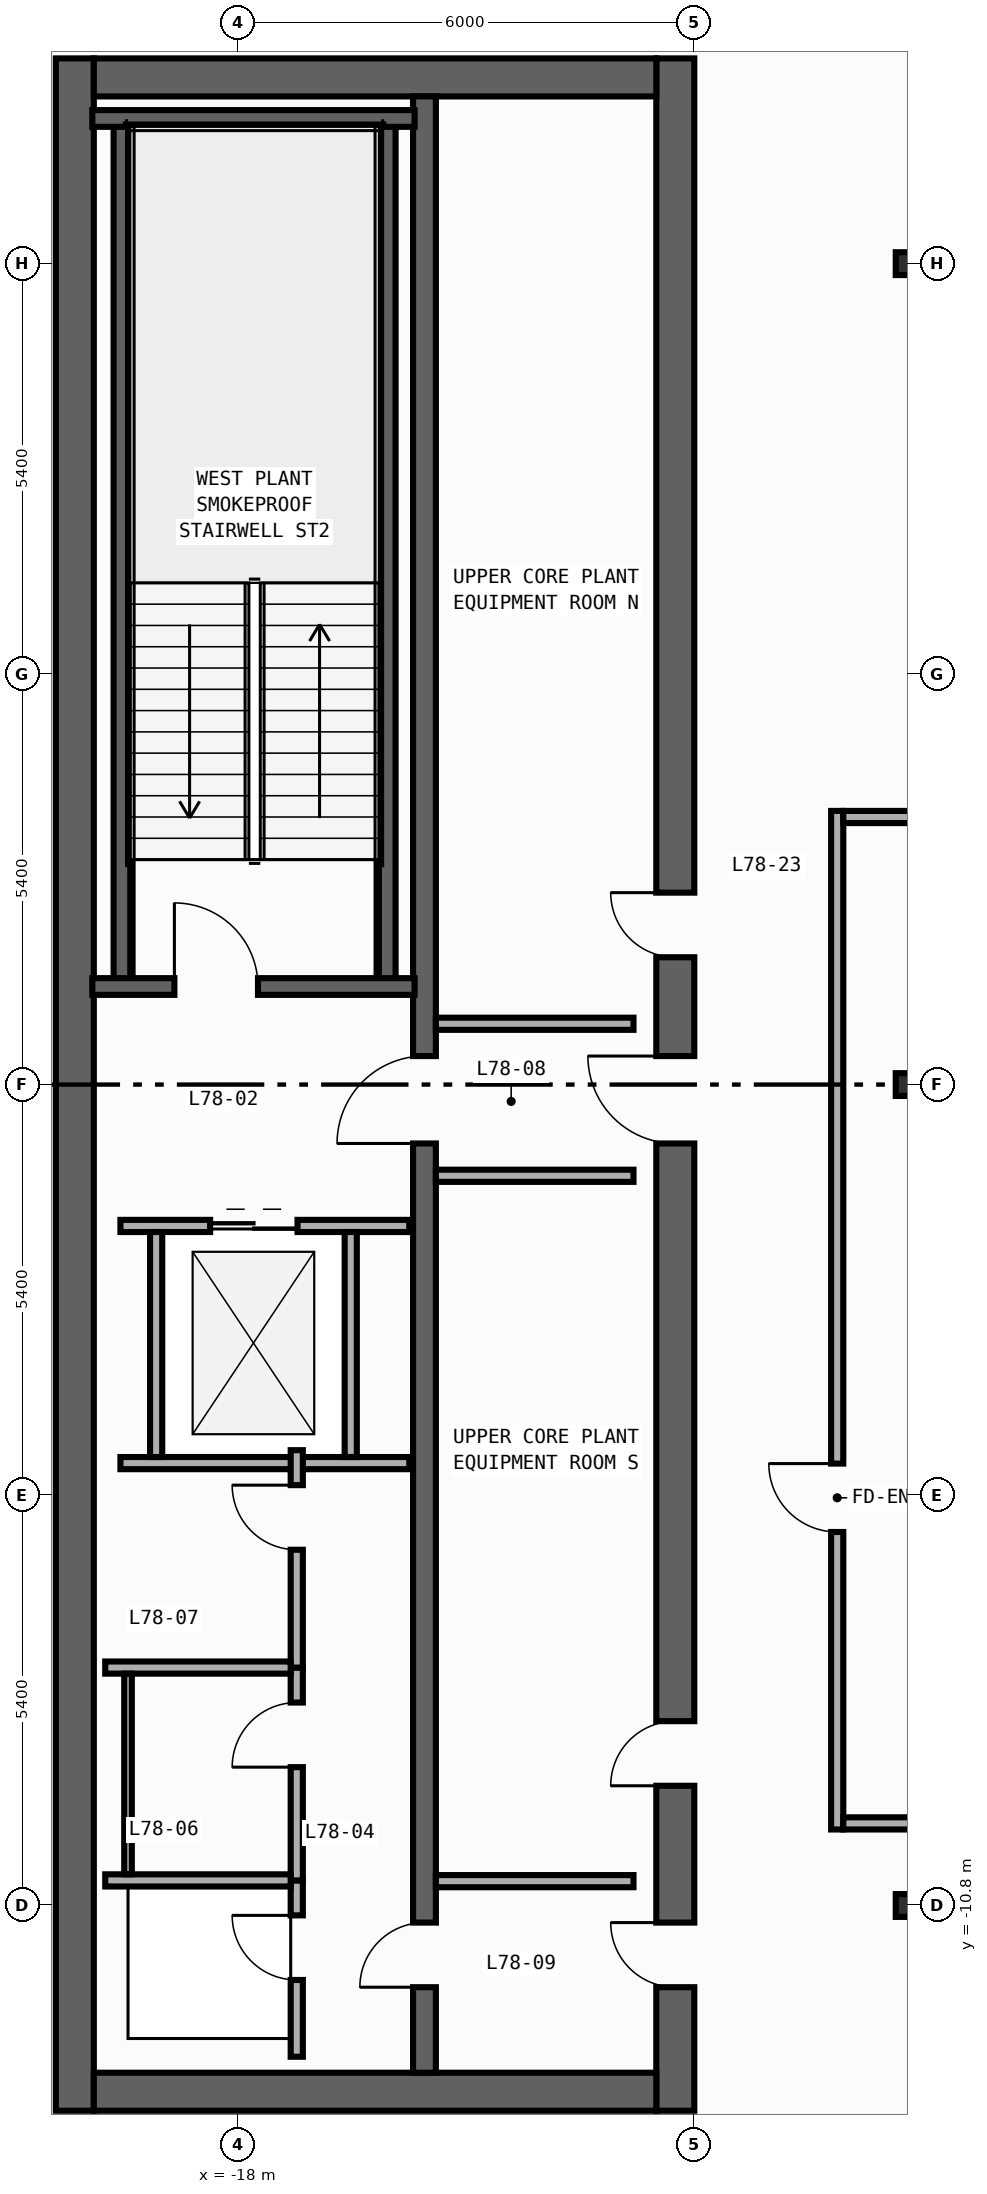
"""IFC4 building model, lengths in metres.
Left out: names, types, materials, properties, quantities, classifications, styles, units other than length and angle.
Written with IfcOpenShell. Run it as: python <this file> out.ifc"""

import sys

from ifc_helpers import new_model, si_unit, direction, frame, frame_2d, origin, origin_2d, place, context, subcontext, project, spatial, rectangle, i_section, extrude, element, fill, save


model = new_model("IFC4")
c1 = context("Model", 3, precision=1e-05, world=origin(), true_north=direction((0.0, 1.0)))
c2 = subcontext(c1, "Body", "Model", "MODEL_VIEW")
j1 = project(units=[si_unit("LENGTHUNIT", "METRE"), si_unit("PLANEANGLEUNIT", "RADIAN")], contexts=[c1])
p1 = place(None, origin())
s1 = spatial("IfcSite", under=j1, at=p1, CompositionType="ELEMENT")
p2 = place(p1, origin())
s2 = spatial("IfcBuilding", under=s1, at=p2, CompositionType="ELEMENT")
p3 = place(p2, frame((0.0, 0.0, 325.2)))
s3 = spatial("IfcBuildingStorey", under=s2, at=p3, CompositionType="ELEMENT", Elevation=325.2)
p4 = place(p3, frame((-20.15, -13.5, 0.0), z_axis=(0.0, 0.0, 1.0), x_axis=(0.0, 1.0, 0.0)))
e1 = element("IfcWall", 1, at=p4, inside=s3, PredefinedType="SHEAR", context=c2, shape_type="SweptSolid", body=[
    extrude(rectangle(XDim=27.0, YDim=0.5, at=frame_2d((13.5, 0.0))), origin(), (0.0, 0.0, 1.0), 4.94),
])
p5 = place(p3, frame((-12.25, -13.5, 0.0), z_axis=(0.0, 0.0, 1.0), x_axis=(0.0, 1.0, 0.0)))
e2 = element("IfcWall", 2, at=p5, inside=s3, PredefinedType="SHEAR", context=c2, shape_type="SweptSolid", body=[
    extrude(rectangle(XDim=27.0, YDim=0.5, at=frame_2d((13.5, 0.0))), origin(), (0.0, 0.0, 1.0), 4.94),
])
p6 = place(p5, frame((15.175, 0.0, 0.0)))
e3 = element("IfcOpeningElement", 3, at=p6, cuts=e2, PredefinedType="OPENING", context=c2, shape_type="SweptSolid", body=[
    extrude(rectangle(XDim=0.85, YDim=2.1, at=frame_2d((0.425, 1.05))), frame((0.0, 0.26, 0.0), z_axis=(0.0, -1.0, 0.0), x_axis=(1.0, 0.0, 0.0)), (0.0, 0.0, 1.0), 0.52),
])
p7 = place(p5, frame((4.275, 0.0, 0.0)))
e4 = element("IfcOpeningElement", 4, at=p7, cuts=e2, PredefinedType="OPENING", context=c2, shape_type="SweptSolid", body=[
    extrude(rectangle(XDim=0.85, YDim=2.1, at=frame_2d((0.425, 1.05))), frame((0.0, 0.26, 0.0), z_axis=(0.0, -1.0, 0.0), x_axis=(1.0, 0.0, 0.0)), (0.0, 0.0, 1.0), 0.52),
])
p8 = place(p5, frame((12.725, 0.0, 0.0)))
e5 = element("IfcOpeningElement", 5, at=p8, cuts=e2, PredefinedType="OPENING", context=c2, shape_type="SweptSolid", body=[
    extrude(rectangle(XDim=1.15, YDim=2.2, at=frame_2d((0.575, 1.1))), frame((0.0, 0.26, 0.0), z_axis=(0.0, -1.0, 0.0), x_axis=(1.0, 0.0, 0.0)), (0.0, 0.0, 1.0), 0.52),
])
p9 = place(p5, frame((1.625, 0.0, 0.0)))
e6 = element("IfcOpeningElement", 6, at=p9, cuts=e2, PredefinedType="OPENING", context=c2, shape_type="SweptSolid", body=[
    extrude(rectangle(XDim=0.85, YDim=2.1, at=frame_2d((0.425, 1.05))), frame((0.0, 0.26, 0.0), z_axis=(0.0, -1.0, 0.0), x_axis=(1.0, 0.0, 0.0)), (0.0, 0.0, 1.0), 0.52),
])
for number, where, z_axis, x_axis in (
    (7, (-19.9, -13.25, 0.0), (0.0, 0.0, 1.0), (1.0, 0.0, 0.0)),
    (8, (-19.9, 13.25, 0.0), (0.0, 0.0, 1.0), (1.0, 0.0, 0.0)),
):
    element("IfcWall", number, at=place(p3, frame(where, z_axis=z_axis, x_axis=x_axis)), inside=s3, PredefinedType="SHEAR", context=c2, shape_type="SweptSolid", body=[
        extrude(rectangle(XDim=7.4, YDim=0.5, at=frame_2d((3.7, 0.0))), origin(), (0.0, 0.0, 1.0), 4.94),
    ])
p10 = place(p3, frame((-15.55, -13.0, 0.0), z_axis=(0.0, 0.0, 1.0), x_axis=(0.0, 1.0, 0.0)))
e9 = element("IfcWall", 9, at=p10, inside=s3, PredefinedType="SHEAR", context=c2, shape_type="SweptSolid", body=[
    extrude(rectangle(XDim=26.0, YDim=0.3, at=frame_2d((13.0, 0.0))), origin(), (0.0, 0.0, 1.0), 4.94),
])
p11 = place(p10, frame((12.225, 0.0, 0.0)))
e10 = element("IfcOpeningElement", 10, at=p11, cuts=e9, PredefinedType="OPENING", context=c2, shape_type="SweptSolid", body=[
    extrude(rectangle(XDim=1.15, YDim=2.2, at=frame_2d((0.575, 1.1))), frame((0.0, 0.16, 0.0), z_axis=(0.0, -1.0, 0.0), x_axis=(1.0, 0.0, 0.0)), (0.0, 0.0, 1.0), 0.32),
])
p12 = place(p10, frame((1.125, 0.0, 0.0)))
e11 = element("IfcOpeningElement", 11, at=p12, cuts=e9, PredefinedType="OPENING", context=c2, shape_type="SweptSolid", body=[
    extrude(rectangle(XDim=0.85, YDim=2.1, at=frame_2d((0.425, 1.05))), frame((0.0, 0.16, 0.0), z_axis=(0.0, -1.0, 0.0), x_axis=(1.0, 0.0, 0.0)), (0.0, 0.0, 1.0), 0.32),
])
for number, where, z_axis, x_axis in (
    (12, (-16.04, 1.29, 0.0), (0.0, 0.0, 1.0), (0.0, 1.0, 0.0)),
    (13, (-19.53, 1.29, 0.0), (0.0, 0.0, 1.0), (0.0, 1.0, 0.0)),
):
    element("IfcWall", number, at=place(p3, frame(where, z_axis=z_axis, x_axis=x_axis)), inside=s3, PredefinedType="SHEAR", context=c2, shape_type="SweptSolid", body=[
        extrude(rectangle(XDim=11.42, YDim=0.22, at=frame_2d((5.71, 0.0))), origin(), (0.0, 0.0, 1.0), 4.94),
    ])
p13 = place(p3, frame((-19.92, 12.71, 0.0), z_axis=(0.0, 0.0, 1.0), x_axis=(1.0, 0.0, 0.0)))
e14 = element("IfcWall", 14, at=p13, inside=s3, PredefinedType="SHEAR", context=c2, shape_type="SweptSolid", body=[
    extrude(rectangle(XDim=4.24, YDim=0.22, at=frame_2d((2.12, 0.0))), origin(), (0.0, 0.0, 1.0), 4.94),
])
p14 = place(p3, frame((-19.92, 1.29, 0.0), z_axis=(0.0, 0.0, 1.0), x_axis=(1.0, 0.0, 0.0)))
e15 = element("IfcWall", 15, at=p14, inside=s3, PredefinedType="SHEAR", context=c2, shape_type="SweptSolid", body=[
    extrude(rectangle(XDim=4.24, YDim=0.22, at=frame_2d((2.12, 0.0))), origin(), (0.0, 0.0, 1.0), 4.94),
])
p15 = place(p14, frame((1.08, 0.0, 0.0)))
e16 = element("IfcOpeningElement", 16, at=p15, cuts=e15, PredefinedType="OPENING", context=c2, shape_type="SweptSolid", body=[
    extrude(rectangle(XDim=1.1, YDim=2.2, at=frame_2d((0.55, 1.1))), frame((0.0, 0.12, 0.0), z_axis=(0.0, -1.0, 0.0), x_axis=(1.0, 0.0, 0.0)), (0.0, 0.0, 1.0), 0.24),
])
for number, where, z_axis, x_axis in (
    (17, (-9.2, -10.8, 0.0), (0.0, 0.0, 1.0), (1.0, 0.0, 0.0)),
    (18, (-9.2, 0.0, 0.0), (0.0, 0.0, 1.0), (1.0, 0.0, 0.0)),
    (19, (-9.2, 10.8, 0.0), (0.0, 0.0, 1.0), (1.0, 0.0, 0.0)),
):
    element("IfcColumn", number, at=place(p3, frame(where, z_axis=z_axis, x_axis=x_axis)), inside=s3, PredefinedType="COLUMN", context=c2, shape_type="SweptSolid", body=[
        extrude(i_section(OverallWidth=0.3, OverallDepth=0.3, WebThickness=0.01, FlangeThickness=0.015, FilletRadius=0.018, at=origin_2d()), origin(), (0.0, 0.0, 1.0), 5.2),
    ])
p16 = place(p3, frame((-19.55, -1.86, 0.0), z_axis=(0.0, 0.0, 1.0), x_axis=(1.0, 0.0, 0.0)))
e20 = element("IfcWall", 20, at=p16, inside=s3, PredefinedType="STANDARD", context=c2, shape_type="SweptSolid", body=[
    extrude(rectangle(XDim=3.8, YDim=0.16, at=frame_2d((1.9, 0.0))), origin(), (0.0, 0.0, 1.0), 4.94),
])
p17 = place(p16, frame((1.18, 0.0, 0.0)))
e21 = element("IfcOpeningElement", 21, at=p17, cuts=e20, PredefinedType="OPENING", context=c2, shape_type="SweptSolid", body=[
    extrude(rectangle(XDim=1.15, YDim=2.2, at=frame_2d((0.575, 1.1))), frame((0.0, 0.09, 0.0), z_axis=(0.0, -1.0, 0.0), x_axis=(1.0, 0.0, 0.0)), (0.0, 0.0, 1.0), 0.18),
])
p18 = place(p3, frame((-19.55, -4.98, 0.0), z_axis=(0.0, 0.0, 1.0), x_axis=(1.0, 0.0, 0.0)))
e22 = element("IfcWall", 22, at=p18, inside=s3, PredefinedType="STANDARD", context=c2, shape_type="SweptSolid", body=[
    extrude(rectangle(XDim=3.8, YDim=0.16, at=frame_2d((1.9, 0.0))), origin(), (0.0, 0.0, 1.0), 4.94),
])
for number, where, z_axis, x_axis in (
    (23, (-19.08, -4.9, 0.0), (0.0, 0.0, 1.0), (0.0, 1.0, 0.0)),
    (24, (-16.52, -4.9, 0.0), (0.0, 0.0, 1.0), (0.0, 1.0, 0.0)),
):
    element("IfcWall", number, at=place(p3, frame(where, z_axis=z_axis, x_axis=x_axis)), inside=s3, PredefinedType="STANDARD", context=c2, shape_type="SweptSolid", body=[
        extrude(rectangle(XDim=2.96, YDim=0.16, at=frame_2d((1.48, 0.0))), origin(), (0.0, 0.0, 1.0), 4.94),
    ])
for number, where, z_axis, x_axis in (
    (25, (-15.4, 0.8, 0.0), (0.0, 0.0, 1.0), (1.0, 0.0, 0.0)),
    (26, (-15.4, -1.2, 0.0), (0.0, 0.0, 1.0), (1.0, 0.0, 0.0)),
    (27, (-15.4, -10.48, 0.0), (0.0, 0.0, 1.0), (1.0, 0.0, 0.0)),
):
    element("IfcWall", number, at=place(p3, frame(where, z_axis=z_axis, x_axis=x_axis)), inside=s3, PredefinedType="STANDARD", context=c2, shape_type="SweptSolid", body=[
        extrude(rectangle(XDim=2.6, YDim=0.16, at=frame_2d((1.3, 0.0))), origin(), (0.0, 0.0, 1.0), 4.94),
    ])
p19 = place(p3, frame((-17.23, -12.79, 0.0), z_axis=(0.0, 0.0, 1.0), x_axis=(0.0, 1.0, 0.0)))
e28 = element("IfcWall", 28, at=p19, inside=s3, PredefinedType="PARTITIONING", context=c2, shape_type="SweptSolid", body=[
    extrude(rectangle(XDim=2.32, YDim=0.16, at=frame_2d((1.16, 0.0))), origin(), (0.0, 0.0, 1.0), 4.94),
])
p20 = place(p19, frame((1.01, 0.0, 0.0)))
e29 = element("IfcOpeningElement", 29, at=p20, cuts=e28, PredefinedType="OPENING", context=c2, shape_type="SweptSolid", body=[
    extrude(rectangle(XDim=0.85, YDim=2.1, at=frame_2d((0.425, 1.05))), frame((0.0, 0.09, 0.0), z_axis=(0.0, -1.0, 0.0), x_axis=(1.0, 0.0, 0.0)), (0.0, 0.0, 1.0), 0.18),
])
p21 = place(p3, frame((-17.23, -10.47, 0.0), z_axis=(0.0, 0.0, 1.0), x_axis=(0.0, 1.0, 0.0)))
e30 = element("IfcWall", 30, at=p21, inside=s3, PredefinedType="PARTITIONING", context=c2, shape_type="SweptSolid", body=[
    extrude(rectangle(XDim=2.8, YDim=0.16, at=frame_2d((1.4, 0.0))), origin(), (0.0, 0.0, 1.0), 4.94),
])
p22 = place(p21, frame((1.49, 0.0, 0.0)))
e31 = element("IfcOpeningElement", 31, at=p22, cuts=e30, PredefinedType="OPENING", context=c2, shape_type="SweptSolid", body=[
    extrude(rectangle(XDim=0.85, YDim=2.1, at=frame_2d((0.425, 1.05))), frame((0.0, 0.09, 0.0), z_axis=(0.0, -1.0, 0.0), x_axis=(1.0, 0.0, 0.0)), (0.0, 0.0, 1.0), 0.18),
])
p23 = place(p3, frame((-17.23, -7.67, 0.0), z_axis=(0.0, 0.0, 1.0), x_axis=(0.0, 1.0, 0.0)))
e32 = element("IfcWall", 32, at=p23, inside=s3, PredefinedType="PARTITIONING", context=c2, shape_type="SweptSolid", body=[
    extrude(rectangle(XDim=2.86, YDim=0.16, at=frame_2d((1.43, 0.0))), origin(), (0.0, 0.0, 1.0), 4.94),
])
p24 = place(p23, frame((1.55, 0.0, 0.0)))
e33 = element("IfcOpeningElement", 33, at=p24, cuts=e32, PredefinedType="OPENING", context=c2, shape_type="SweptSolid", body=[
    extrude(rectangle(XDim=0.85, YDim=2.1, at=frame_2d((0.425, 1.05))), frame((0.0, 0.09, 0.0), z_axis=(0.0, -1.0, 0.0), x_axis=(1.0, 0.0, 0.0)), (0.0, 0.0, 1.0), 0.18),
])
for number, where, z_axis, x_axis in (
    (34, (-19.75, -10.47, 0.0), (0.0, 0.0, 1.0), (1.0, 0.0, 0.0)),
    (35, (-19.75, -7.67, 0.0), (0.0, 0.0, 1.0), (1.0, 0.0, 0.0)),
):
    element("IfcWall", number, at=place(p3, frame(where, z_axis=z_axis, x_axis=x_axis)), inside=s3, PredefinedType="PARTITIONING", context=c2, shape_type="SweptSolid", body=[
        extrude(rectangle(XDim=2.44, YDim=0.16, at=frame_2d((1.22, 0.0))), origin(), (0.0, 0.0, 1.0), 4.94),
    ])
p25 = place(p3, frame((-10.12, -9.8, 0.0), z_axis=(0.0, 0.0, 1.0), x_axis=(0.0, 1.0, 0.0)))
e36 = element("IfcWall", 36, at=p25, inside=s3, PredefinedType="PARTITIONING", context=c2, shape_type="SweptSolid", body=[
    extrude(rectangle(XDim=13.4, YDim=0.16, at=frame_2d((6.7, 0.0))), origin(), (0.0, 0.0, 1.0), 4.94),
])
p26 = place(p25, frame((3.914, 0.0, 0.0)))
e37 = element("IfcOpeningElement", 37, at=p26, cuts=e36, PredefinedType="OPENING", context=c2, shape_type="SweptSolid", body=[
    extrude(rectangle(XDim=0.9, YDim=2.15, at=frame_2d((0.45, 1.075))), frame((0.0, 0.09, 0.0), z_axis=(0.0, -1.0, 0.0), x_axis=(1.0, 0.0, 0.0)), (0.0, 0.0, 1.0), 0.18),
])
p27 = place(p3, frame((-10.04, 3.52, 0.0), z_axis=(0.0, 0.0, 1.0), x_axis=(1.0, 0.0, 0.0)))
e38 = element("IfcWall", 38, at=p27, inside=s3, PredefinedType="PARTITIONING", context=c2, shape_type="SweptSolid", body=[
    extrude(rectangle(XDim=20.08, YDim=0.16, at=frame_2d((10.04, 0.0))), origin(), (0.0, 0.0, 1.0), 4.94),
])
p28 = place(p27, frame((9.49, 0.0, 0.0)))
e39 = element("IfcOpeningElement", 39, at=p28, cuts=e38, PredefinedType="OPENING", context=c2, shape_type="SweptSolid", body=[
    extrude(rectangle(XDim=0.9, YDim=2.15, at=frame_2d((0.45, 1.075))), frame((0.0, 0.09, 0.0), z_axis=(0.0, -1.0, 0.0), x_axis=(1.0, 0.0, 0.0)), (0.0, 0.0, 1.0), 0.18),
])
p29 = place(p3, frame((-10.04, -9.72, 0.0), z_axis=(0.0, 0.0, 1.0), x_axis=(1.0, 0.0, 0.0)))
e40 = element("IfcWall", 40, at=p29, inside=s3, PredefinedType="PARTITIONING", context=c2, shape_type="SweptSolid", body=[
    extrude(rectangle(XDim=20.08, YDim=0.16, at=frame_2d((10.04, 0.0))), origin(), (0.0, 0.0, 1.0), 4.94),
])
p30 = place(p29, frame((9.49, 0.0, 0.0)))
e41 = element("IfcOpeningElement", 41, at=p30, cuts=e40, PredefinedType="OPENING", context=c2, shape_type="SweptSolid", body=[
    extrude(rectangle(XDim=0.9, YDim=2.15, at=frame_2d((0.45, 1.075))), frame((0.0, 0.09, 0.0), z_axis=(0.0, -1.0, 0.0), x_axis=(1.0, 0.0, 0.0)), (0.0, 0.0, 1.0), 0.18),
])
p31 = place(p3, frame((-19.45, -10.39, 0.0), z_axis=(0.0, 0.0, 1.0), x_axis=(0.0, 1.0, 0.0)))
e42 = element("IfcWall", 42, at=p31, inside=s3, PredefinedType="PARTITIONING", context=c2, shape_type="SweptSolid", body=[
    extrude(rectangle(XDim=2.64, YDim=0.1, at=frame_2d((1.32, 0.0))), origin(), (0.0, 0.0, 1.0), 4.94),
])
p32 = place(p15, origin())
e43 = element("IfcDoor", 43, at=p32, inside=s3, OperationType="SINGLE_SWING_LEFT", PredefinedType="DOOR", context=c2, shape_type="SweptSolid", body=[
    extrude(rectangle(XDim=1.1, YDim=2.2, at=frame_2d((0.55, 1.1))), frame((0.0, 0.025, 0.0), z_axis=(0.0, -1.0, 0.0), x_axis=(1.0, 0.0, 0.0)), (0.0, 0.0, 1.0), 0.05),
])
fill(e16, e43)
p33 = place(p6, origin())
e44 = element("IfcDoor", 44, at=p33, inside=s3, OperationType="SINGLE_SWING_RIGHT", PredefinedType="DOOR", context=c2, shape_type="SweptSolid", body=[
    extrude(rectangle(XDim=0.85, YDim=2.1, at=frame_2d((0.425, 1.05))), frame((0.0, 0.025, 0.0), z_axis=(0.0, -1.0, 0.0), x_axis=(1.0, 0.0, 0.0)), (0.0, 0.0, 1.0), 0.05),
])
fill(e3, e44)
p34 = place(p7, origin())
e45 = element("IfcDoor", 45, at=p34, inside=s3, OperationType="SINGLE_SWING_LEFT", PredefinedType="DOOR", context=c2, shape_type="SweptSolid", body=[
    extrude(rectangle(XDim=0.85, YDim=2.1, at=frame_2d((0.425, 1.05))), frame((0.0, 0.025, 0.0), z_axis=(0.0, -1.0, 0.0), x_axis=(1.0, 0.0, 0.0)), (0.0, 0.0, 1.0), 0.05),
])
fill(e4, e45)
p35 = place(p8, origin())
e46 = element("IfcDoor", 46, at=p35, inside=s3, OperationType="SINGLE_SWING_RIGHT", PredefinedType="DOOR", context=c2, shape_type="SweptSolid", body=[
    extrude(rectangle(XDim=1.15, YDim=2.2, at=frame_2d((0.575, 1.1))), frame((0.0, 0.025, 0.0), z_axis=(0.0, -1.0, 0.0), x_axis=(1.0, 0.0, 0.0)), (0.0, 0.0, 1.0), 0.05),
])
fill(e5, e46)
p36 = place(p11, origin())
e47 = element("IfcDoor", 47, at=p36, inside=s3, OperationType="SINGLE_SWING_LEFT", PredefinedType="DOOR", context=c2, shape_type="SweptSolid", body=[
    extrude(rectangle(XDim=1.15, YDim=2.2, at=frame_2d((0.575, 1.1))), frame((0.0, 0.025, 0.0), z_axis=(0.0, -1.0, 0.0), x_axis=(1.0, 0.0, 0.0)), (0.0, 0.0, 1.0), 0.05),
])
fill(e10, e47)
p37 = place(p9, origin())
e48 = element("IfcDoor", 48, at=p37, inside=s3, OperationType="SINGLE_SWING_RIGHT", PredefinedType="DOOR", context=c2, shape_type="SweptSolid", body=[
    extrude(rectangle(XDim=0.85, YDim=2.1, at=frame_2d((0.425, 1.05))), frame((0.0, 0.025, 0.0), z_axis=(0.0, -1.0, 0.0), x_axis=(1.0, 0.0, 0.0)), (0.0, 0.0, 1.0), 0.05),
])
fill(e6, e48)
p38 = place(p12, origin())
e49 = element("IfcDoor", 49, at=p38, inside=s3, OperationType="SINGLE_SWING_LEFT", PredefinedType="DOOR", context=c2, shape_type="SweptSolid", body=[
    extrude(rectangle(XDim=0.85, YDim=2.1, at=frame_2d((0.425, 1.05))), frame((0.0, 0.025, 0.0), z_axis=(0.0, -1.0, 0.0), x_axis=(1.0, 0.0, 0.0)), (0.0, 0.0, 1.0), 0.05),
])
fill(e11, e49)
p39 = place(p17, origin())
e50 = element("IfcDoor", 50, at=p39, inside=s3, OperationType="DOUBLE_DOOR_SLIDING", PredefinedType="DOOR", context=c2, shape_type="SweptSolid", body=[
    extrude(rectangle(XDim=1.15, YDim=2.2, at=frame_2d((0.575, 1.1))), frame((0.0, 0.025, 0.0), z_axis=(0.0, -1.0, 0.0), x_axis=(1.0, 0.0, 0.0)), (0.0, 0.0, 1.0), 0.05),
])
fill(e21, e50)
p40 = place(p20, origin())
e51 = element("IfcDoor", 51, at=p40, inside=s3, OperationType="SINGLE_SWING_RIGHT", PredefinedType="DOOR", context=c2, shape_type="SweptSolid", body=[
    extrude(rectangle(XDim=0.85, YDim=2.1, at=frame_2d((0.425, 1.05))), frame((0.0, 0.025, 0.0), z_axis=(0.0, -1.0, 0.0), x_axis=(1.0, 0.0, 0.0)), (0.0, 0.0, 1.0), 0.05),
])
fill(e29, e51)
p41 = place(p22, origin())
e52 = element("IfcDoor", 52, at=p41, inside=s3, OperationType="SINGLE_SWING_LEFT", PredefinedType="DOOR", context=c2, shape_type="SweptSolid", body=[
    extrude(rectangle(XDim=0.85, YDim=2.1, at=frame_2d((0.425, 1.05))), frame((0.0, 0.025, 0.0), z_axis=(0.0, -1.0, 0.0), x_axis=(1.0, 0.0, 0.0)), (0.0, 0.0, 1.0), 0.05),
])
fill(e31, e52)
p42 = place(p24, origin())
e53 = element("IfcDoor", 53, at=p42, inside=s3, OperationType="SINGLE_SWING_RIGHT", PredefinedType="DOOR", context=c2, shape_type="SweptSolid", body=[
    extrude(rectangle(XDim=0.85, YDim=2.1, at=frame_2d((0.425, 1.05))), frame((0.0, 0.025, 0.0), z_axis=(0.0, -1.0, 0.0), x_axis=(1.0, 0.0, 0.0)), (0.0, 0.0, 1.0), 0.05),
])
fill(e33, e53)
p43 = place(p26, origin())
e54 = element("IfcDoor", 54, at=p43, inside=s3, OperationType="SINGLE_SWING_RIGHT", PredefinedType="DOOR", context=c2, shape_type="SweptSolid", body=[
    extrude(rectangle(XDim=0.9, YDim=2.15, at=frame_2d((0.45, 1.075))), frame((0.0, 0.025, 0.0), z_axis=(0.0, -1.0, 0.0), x_axis=(1.0, 0.0, 0.0)), (0.0, 0.0, 1.0), 0.05),
])
fill(e37, e54)
save(model, sys.argv[1])
